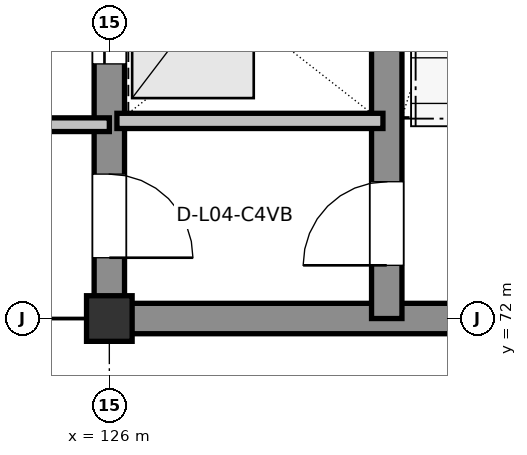
"""IFC4 building model, lengths in metres.
Left out: names, types, materials, properties, quantities, classifications, styles, units other than length and angle.
Written with IfcOpenShell. Run it as: python <this file> out.ifc"""

import sys

from ifc_helpers import new_model, si_unit, direction, frame, frame_2d, origin, origin_2d, place, context, subcontext, project, spatial, rectangle, extrude, element, fill, save


model = new_model("IFC4")
c1 = context("Model", 3, precision=1e-05, world=origin(), true_north=direction((0.0, 1.0)))
c2 = subcontext(c1, "Body", "Model", "MODEL_VIEW")
j1 = project(units=[si_unit("LENGTHUNIT", "METRE"), si_unit("PLANEANGLEUNIT", "RADIAN")], contexts=[c1])
p1 = place(None, origin())
s1 = spatial("IfcSite", under=j1, at=p1, CompositionType="ELEMENT")
p2 = place(p1, origin())
s2 = spatial("IfcBuilding", under=s1, at=p2, CompositionType="ELEMENT")
p3 = place(p2, frame((0.0, 0.0, 19.2)))
s3 = spatial("IfcBuildingStorey", under=s2, at=p3, CompositionType="ELEMENT", Elevation=19.2)
p4 = place(p3, frame((126.0, 72.0, 0.0), z_axis=(0.0, 0.0, 1.0), x_axis=(1.0, 0.0, 0.0)))
e1 = element("IfcColumn", 1, at=p4, inside=s3, PredefinedType="COLUMN", context=c2, shape_type="SweptSolid", body=[
    extrude(rectangle(XDim=0.6, YDim=0.6, at=origin_2d()), origin(), (0.0, 0.0, 1.0), 4.2),
])
p5 = place(p3, frame((126.0, 72.0, 0.0), z_axis=(0.0, 0.0, 1.0), x_axis=(1.0, 0.0, 0.0)))
e2 = element("IfcWall", 2, at=p5, inside=s3, PredefinedType="SHEAR", context=c2, shape_type="SweptSolid", body=[
    extrude(rectangle(XDim=9.0, YDim=0.4, at=frame_2d((4.5, 0.0))), origin(), (0.0, 0.0, 1.0), 3.96),
])
p6 = place(p3, frame((126.0, 90.0, 0.0), z_axis=(0.0, 0.0, 1.0), x_axis=(0.0, -1.0, 0.0)))
e3 = element("IfcWall", 3, at=p6, inside=s3, PredefinedType="SHEAR", context=c2, shape_type="SweptSolid", body=[
    extrude(rectangle(XDim=18.0, YDim=0.4, at=frame_2d((9.0, 0.0))), origin(), (0.0, 0.0, 1.0), 3.96),
])
p7 = place(p6, frame((16.1, 0.0, 0.0)))
e4 = element("IfcOpeningElement", 4, at=p7, cuts=e3, PredefinedType="OPENING", context=c2, shape_type="SweptSolid", body=[
    extrude(rectangle(XDim=1.1, YDim=2.16, at=frame_2d((0.55, 1.08))), frame((0.0, 0.21, 0.0), z_axis=(0.0, -1.0, 0.0), x_axis=(1.0, 0.0, 0.0)), (0.0, 0.0, 1.0), 0.42),
])
p8 = place(p6, frame((13.45, 0.0, 0.0)))
e5 = element("IfcOpeningElement", 5, at=p8, cuts=e3, PredefinedType="OPENING", context=c2, shape_type="SweptSolid", body=[
    extrude(rectangle(XDim=1.2, YDim=2.2, at=frame_2d((0.6, 1.1))), frame((0.0, 0.21, 0.0), z_axis=(0.0, -1.0, 0.0), x_axis=(1.0, 0.0, 0.0)), (0.0, 0.0, 1.0), 0.42),
])
p9 = place(p6, frame((10.65, 0.0, 0.0)))
e6 = element("IfcOpeningElement", 6, at=p9, cuts=e3, PredefinedType="OPENING", context=c2, shape_type="SweptSolid", body=[
    extrude(rectangle(XDim=1.2, YDim=2.2, at=frame_2d((0.6, 1.1))), frame((0.0, 0.21, 0.0), z_axis=(0.0, -1.0, 0.0), x_axis=(1.0, 0.0, 0.0)), (0.0, 0.0, 1.0), 0.42),
])
p10 = place(p6, frame((5.9, 0.0, 0.0)))
e7 = element("IfcOpeningElement", 7, at=p10, cuts=e3, PredefinedType="OPENING", context=c2, shape_type="SweptSolid", body=[
    extrude(rectangle(XDim=1.8, YDim=2.35, at=frame_2d((0.9, 1.175))), frame((0.0, 0.21, 0.0), z_axis=(0.0, -1.0, 0.0), x_axis=(1.0, 0.0, 0.0)), (0.0, 0.0, 1.0), 0.42),
])
p11 = place(p3, frame((129.65, 72.0, 0.0), z_axis=(0.0, 0.0, 1.0), x_axis=(0.0, 1.0, 0.0)))
e8 = element("IfcWall", 8, at=p11, inside=s3, PredefinedType="SHEAR", context=c2, shape_type="SweptSolid", body=[
    extrude(rectangle(XDim=18.0, YDim=0.4, at=frame_2d((9.0, 0.0))), origin(), (0.0, 0.0, 1.0), 3.96),
])
p12 = place(p11, frame((0.7, 0.0, 0.0)))
e9 = element("IfcOpeningElement", 9, at=p12, cuts=e8, PredefinedType="OPENING", context=c2, shape_type="SweptSolid", body=[
    extrude(rectangle(XDim=1.1, YDim=2.16, at=frame_2d((0.55, 1.08))), frame((0.0, 0.21, 0.0), z_axis=(0.0, -1.0, 0.0), x_axis=(1.0, 0.0, 0.0)), (0.0, 0.0, 1.0), 0.42),
])
p13 = place(p3, frame((126.1, 74.6, 0.0), z_axis=(0.0, 0.0, 1.0), x_axis=(1.0, 0.0, 0.0)))
e10 = element("IfcWall", 10, at=p13, inside=s3, PredefinedType="PARTITIONING", context=c2, shape_type="SweptSolid", body=[
    extrude(rectangle(XDim=3.5, YDim=0.2, at=frame_2d((1.75, 0.0))), origin(), (0.0, 0.0, 1.0), 3.96),
])
p14 = place(p3, frame((122.25, 74.55, 0.0), z_axis=(0.0, 0.0, 1.0), x_axis=(1.0, 0.0, 0.0)))
e11 = element("IfcWall", 11, at=p14, inside=s3, PredefinedType="PARTITIONING", context=c2, shape_type="SweptSolid", body=[
    extrude(rectangle(XDim=3.75, YDim=0.18, at=frame_2d((1.875, 0.0))), origin(), (0.0, 0.0, 1.0), 3.96),
])
p15 = place(p12, origin())
e12 = element("IfcDoor", 12, at=p15, inside=s3, OperationType="SINGLE_SWING_LEFT", PredefinedType="DOOR", context=c2, shape_type="SweptSolid", body=[
    extrude(rectangle(XDim=1.1, YDim=2.16, at=frame_2d((0.55, 1.08))), frame((0.0, 0.025, 0.0), z_axis=(0.0, -1.0, 0.0), x_axis=(1.0, 0.0, 0.0)), (0.0, 0.0, 1.0), 0.05),
])
fill(e9, e12)
p16 = place(p7, origin())
e13 = element("IfcDoor", 13, at=p16, inside=s3, OperationType="SINGLE_SWING_RIGHT", PredefinedType="DOOR", context=c2, shape_type="SweptSolid", body=[
    extrude(rectangle(XDim=1.1, YDim=2.16, at=frame_2d((0.55, 1.08))), frame((0.0, 0.025, 0.0), z_axis=(0.0, -1.0, 0.0), x_axis=(1.0, 0.0, 0.0)), (0.0, 0.0, 1.0), 0.05),
])
fill(e4, e13)
p17 = place(p8, origin())
e14 = element("IfcDoor", 14, at=p17, inside=s3, OperationType="SLIDING_TO_LEFT", PredefinedType="DOOR", context=c2, shape_type="SweptSolid", body=[
    extrude(rectangle(XDim=1.2, YDim=2.2, at=frame_2d((0.6, 1.1))), frame((0.0, 0.025, 0.0), z_axis=(0.0, -1.0, 0.0), x_axis=(1.0, 0.0, 0.0)), (0.0, 0.0, 1.0), 0.05),
])
fill(e5, e14)
save(model, sys.argv[1])
